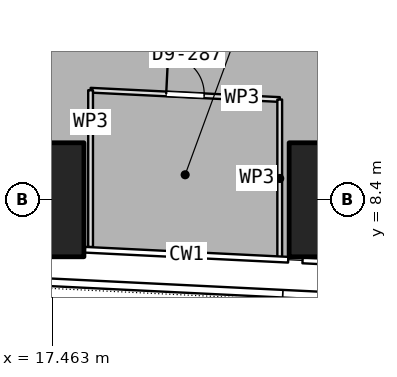
"""IFC4 building model, lengths in metres.
Left out: names, types, materials, properties, quantities, classifications, styles, units other than length and angle.
Written with IfcOpenShell. Run it as: python <this file> out.ifc"""

import sys

from ifc_helpers import new_model, si_unit, direction, frame, frame_2d, origin, origin_2d, place, context, subcontext, project, spatial, rectangle, extrude, element, fill, save


model = new_model("IFC4")
c1 = context("Model", 3, precision=1e-05, world=origin(), true_north=direction((0.0, 1.0)))
c2 = subcontext(c1, "Body", "Model", "MODEL_VIEW")
j1 = project(units=[si_unit("LENGTHUNIT", "METRE"), si_unit("PLANEANGLEUNIT", "RADIAN")], contexts=[c1])
p1 = place(None, origin())
s1 = spatial("IfcSite", under=j1, at=p1, CompositionType="ELEMENT")
p2 = place(p1, origin())
s2 = spatial("IfcBuilding", under=s1, at=p2, CompositionType="ELEMENT")
p3 = place(p2, frame((0.0, 0.0, 81.65)))
s3 = spatial("IfcBuildingStorey", under=s2, at=p3, CompositionType="ELEMENT", Elevation=81.65)
for number, where, z_axis, x_axis in (
    (1, (16.8, 8.4, 0.0), (0.0, 0.0, 1.0), (1.0, 0.0, 0.0)),
    (2, (25.2, 8.4, 0.0), (0.0, 0.0, 1.0), (1.0, 0.0, 0.0)),
):
    element("IfcColumn", number, at=place(p3, frame(where, z_axis=z_axis, x_axis=x_axis)), inside=s3, PredefinedType="COLUMN", context=c2, shape_type="SweptSolid", body=[
        extrude(rectangle(XDim=3.0, YDim=3.0, at=origin_2d()), origin(), (0.0, 0.0, 1.0), 3.75),
    ])
p4 = place(p3, frame((18.475, 11.283, 0.0), z_axis=(0.0, 0.0, 1.0), x_axis=(0.998791733406, -0.049143395075, 0.0)))
e3 = element("IfcWall", 3, at=p4, inside=s3, PredefinedType="PARTITIONING", context=c2, shape_type="SweptSolid", body=[
    extrude(rectangle(XDim=4.983, YDim=0.125, at=frame_2d((2.491, 0.0))), origin(), (0.0, 0.0, 1.0), 3.4),
])
p5 = place(p4, frame((1.992, 0.0, 0.0)))
e4 = element("IfcOpeningElement", 4, at=p5, cuts=e3, PredefinedType="OPENING", context=c2, shape_type="SweptSolid", body=[
    extrude(rectangle(XDim=1.0, YDim=2.1, at=frame_2d((0.5, 1.05))), frame((0.0, 0.073, 0.0), z_axis=(0.0, -1.0, 0.0), x_axis=(1.0, 0.0, 0.0)), (0.0, 0.0, 1.0), 0.145),
])
p6 = place(p3, frame((23.452, 11.038, 0.0), z_axis=(0.0, 0.0, 1.0), x_axis=(0.0, -1.0, 0.0)))
e5 = element("IfcWall", 5, at=p6, inside=s3, PredefinedType="PARTITIONING", context=c2, shape_type="SweptSolid", body=[
    extrude(rectangle(XDim=4.154, YDim=0.125, at=frame_2d((2.077, 0.0))), origin(), (0.0, 0.0, 1.0), 3.4),
])
p7 = place(p3, frame((18.475, 7.158, 0.0), z_axis=(0.0, 0.0, 1.0), x_axis=(0.0, 1.0, 0.0)))
e6 = element("IfcWall", 6, at=p7, inside=s3, PredefinedType="PARTITIONING", context=c2, shape_type="SweptSolid", body=[
    extrude(rectangle(XDim=4.125, YDim=0.125, at=frame_2d((2.062, 0.0))), origin(), (0.0, 0.0, 1.0), 3.4),
])
p8 = place(p5, origin())
e7 = element("IfcDoor", 7, at=p8, inside=s3, OperationType="SINGLE_SWING_LEFT", PredefinedType="DOOR", context=c2, shape_type="SweptSolid", body=[
    extrude(rectangle(XDim=1.0, YDim=2.1, at=frame_2d((0.5, 1.05))), frame((0.0, 0.025, 0.0), z_axis=(0.0, -1.0, 0.0), x_axis=(1.0, 0.0, 0.0)), (0.0, 0.0, 1.0), 0.05),
])
fill(e4, e7)
save(model, sys.argv[1])
